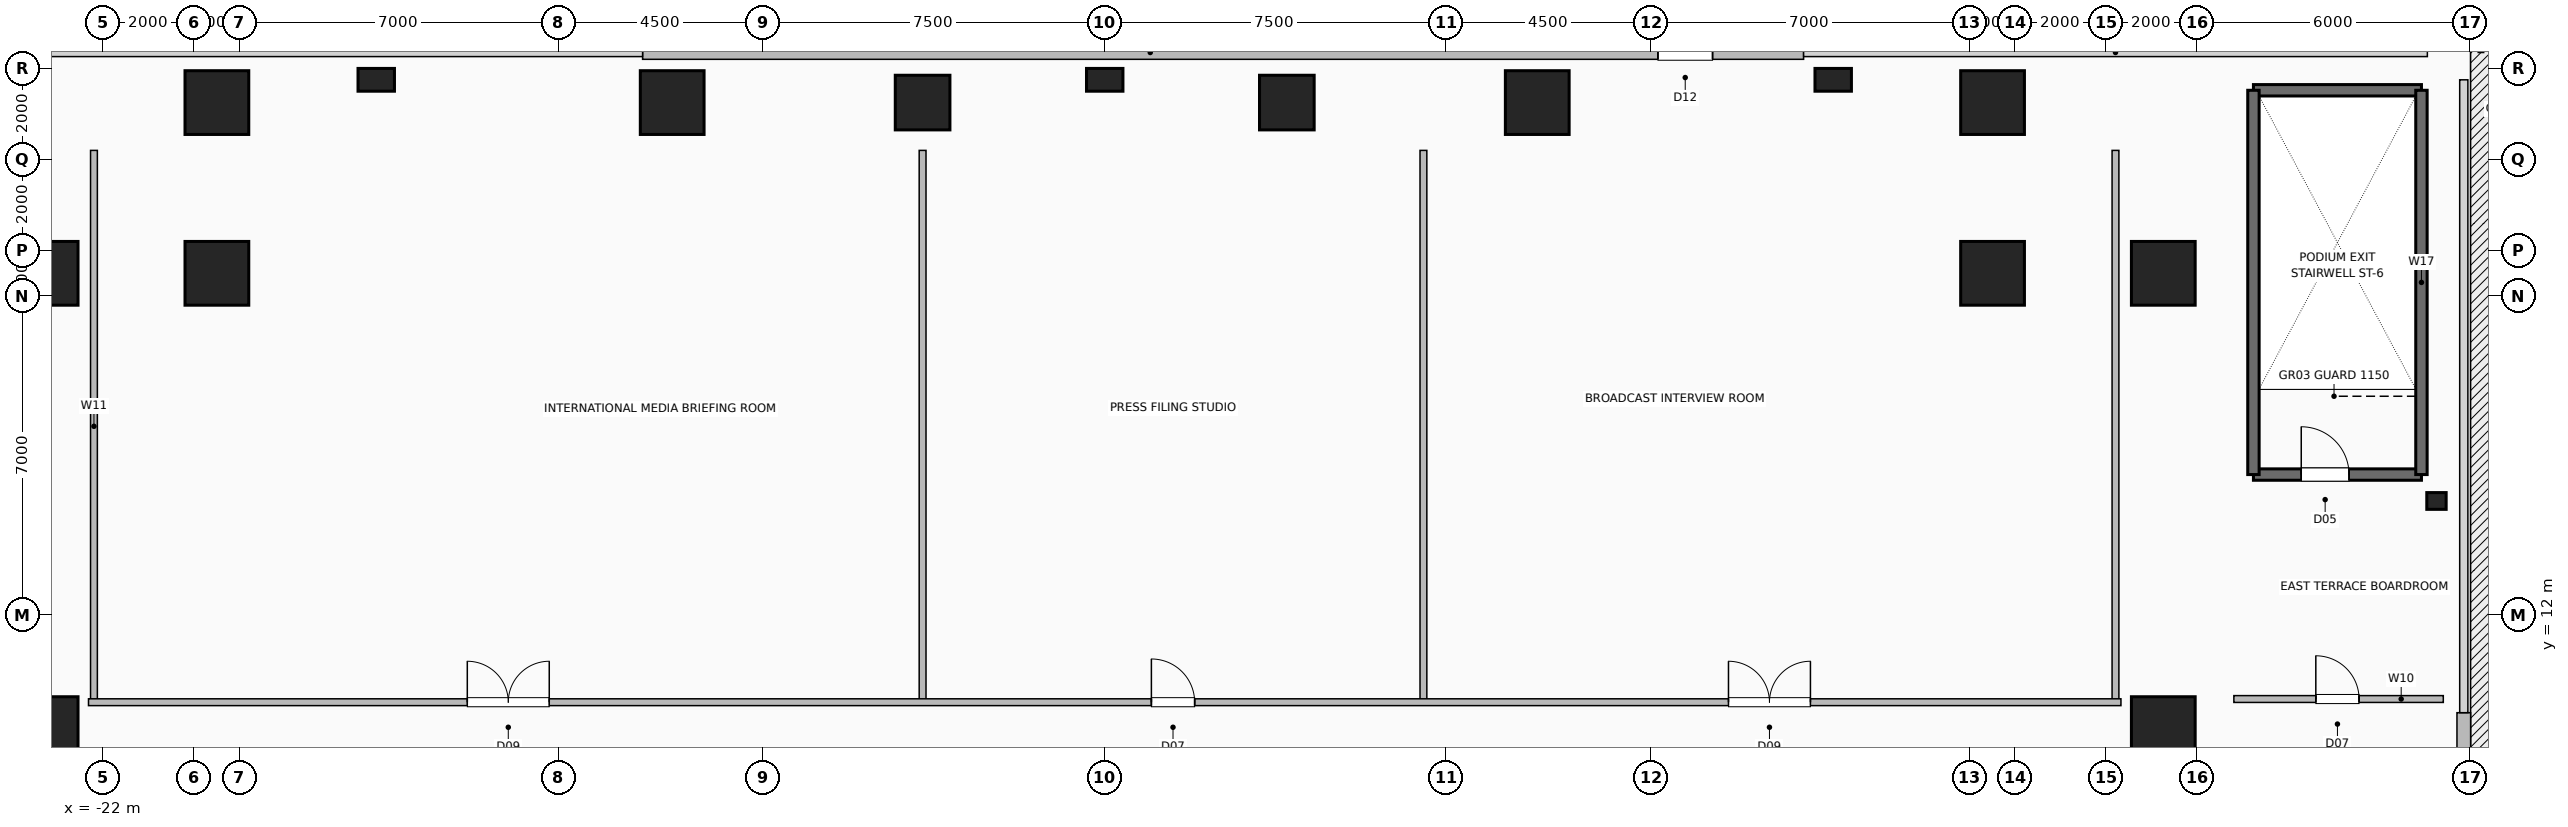
"""IFC4 building model, lengths in metres.
Left out: names, types, materials, properties, quantities, classifications, styles, units other than length and angle.
Written with IfcOpenShell. Run it as: python <this file> out.ifc"""

import sys

from ifc_helpers import new_model, si_unit, direction, frame, frame_2d, origin, origin_2d, place, context, subcontext, project, spatial, rectangle, hollow_rectangle, i_section, extrude, element, fill, save


model = new_model("IFC4")
c1 = context("Model", 3, precision=1e-05, world=origin(), true_north=direction((0.0, 1.0)))
c2 = subcontext(c1, "Body", "Model", "MODEL_VIEW")
j1 = project(units=[si_unit("LENGTHUNIT", "METRE"), si_unit("PLANEANGLEUNIT", "RADIAN")], contexts=[c1])
p1 = place(None, origin())
s1 = spatial("IfcSite", under=j1, at=p1, CompositionType="ELEMENT")
p2 = place(p1, origin())
s2 = spatial("IfcBuilding", under=s1, at=p2, CompositionType="ELEMENT")
p3 = place(p2, frame((0.0, 0.0, 21.6)))
s3 = spatial("IfcBuildingStorey", under=s2, at=p3, CompositionType="ELEMENT", Elevation=21.6)
p4 = place(p3, frame((-19.5, 23.25, 0.0), z_axis=(0.0, 0.0, 1.0), x_axis=(1.0, 0.0, 0.0)))
e1 = element("IfcColumn", 1, at=p4, inside=s3, PredefinedType="COLUMN", context=c2, shape_type="SweptSolid", body=[
    extrude(hollow_rectangle(XDim=1.4, YDim=1.4, WallThickness=0.06, at=origin_2d()), origin(), (0.0, 0.0, 1.0), 5.4),
])
for number, where, z_axis, x_axis in (
    (2, (-9.5, 23.25, 0.0), (0.0, 0.0, 1.0), (1.0, 0.0, 0.0)),
    (3, (9.5, 23.25, 0.0), (0.0, 0.0, 1.0), (1.0, 0.0, 0.0)),
):
    element("IfcColumn", number, at=place(p3, frame(where, z_axis=z_axis, x_axis=x_axis)), inside=s3, PredefinedType="COLUMN", context=c2, shape_type="SweptSolid", body=[
        extrude(hollow_rectangle(XDim=1.4, YDim=1.4, WallThickness=0.06, at=origin_2d()), origin(), (0.0, 0.0, 1.0), 5.0),
    ])
p5 = place(p3, frame((19.5, 23.25, 0.0), z_axis=(0.0, 0.0, 1.0), x_axis=(1.0, 0.0, 0.0)))
e4 = element("IfcColumn", 4, at=p5, inside=s3, PredefinedType="COLUMN", context=c2, shape_type="SweptSolid", body=[
    extrude(hollow_rectangle(XDim=1.4, YDim=1.4, WallThickness=0.06, at=origin_2d()), origin(), (0.0, 0.0, 1.0), 5.4),
])
p6 = place(p3, frame((-23.25, 9.5, 0.0), z_axis=(0.0, 0.0, 1.0), x_axis=(1.0, 0.0, 0.0)))
e5 = element("IfcColumn", 5, at=p6, inside=s3, PredefinedType="COLUMN", context=c2, shape_type="SweptSolid", body=[
    extrude(hollow_rectangle(XDim=1.4, YDim=1.4, WallThickness=0.06, at=origin_2d()), origin(), (0.0, 0.0, 1.0), 5.0),
])
p7 = place(p3, frame((-23.25, 19.5, 0.0), z_axis=(0.0, 0.0, 1.0), x_axis=(1.0, 0.0, 0.0)))
e6 = element("IfcColumn", 6, at=p7, inside=s3, PredefinedType="COLUMN", context=c2, shape_type="SweptSolid", body=[
    extrude(hollow_rectangle(XDim=1.4, YDim=1.4, WallThickness=0.06, at=origin_2d()), origin(), (0.0, 0.0, 1.0), 5.4),
])
p8 = place(p3, frame((23.25, 9.5, 0.0), z_axis=(0.0, 0.0, 1.0), x_axis=(1.0, 0.0, 0.0)))
e7 = element("IfcColumn", 7, at=p8, inside=s3, PredefinedType="COLUMN", context=c2, shape_type="SweptSolid", body=[
    extrude(hollow_rectangle(XDim=1.4, YDim=1.4, WallThickness=0.06, at=origin_2d()), origin(), (0.0, 0.0, 1.0), 5.0),
])
for number, where, z_axis, x_axis in (
    (8, (23.25, 19.5, 0.0), (0.0, 0.0, 1.0), (1.0, 0.0, 0.0)),
    (9, (19.5, 19.5, 0.0), (0.0, 0.0, 1.0), (1.0, 0.0, 0.0)),
    (10, (-19.5, 19.5, 0.0), (0.0, 0.0, 1.0), (1.0, 0.0, 0.0)),
):
    element("IfcColumn", number, at=place(p3, frame(where, z_axis=z_axis, x_axis=x_axis)), inside=s3, PredefinedType="COLUMN", context=c2, shape_type="SweptSolid", body=[
        extrude(hollow_rectangle(XDim=1.4, YDim=1.4, WallThickness=0.06, at=origin_2d()), origin(), (0.0, 0.0, 1.0), 5.4),
    ])
for number, where, z_axis, x_axis in (
    (11, (-4.0, 23.25, -0.4), (0.0, 0.0, 1.0), (1.0, 0.0, 0.0)),
    (12, (4.0, 23.25, -0.4), (0.0, 0.0, 1.0), (1.0, 0.0, 0.0)),
):
    element("IfcColumn", number, at=place(p3, frame(where, z_axis=z_axis, x_axis=x_axis)), inside=s3, PredefinedType="COLUMN", context=c2, shape_type="SweptSolid", body=[
        extrude(hollow_rectangle(XDim=1.2, YDim=1.2, WallThickness=0.055, at=origin_2d()), origin(), (0.0, 0.0, 1.0), 5.8),
    ])
p9 = place(p3, frame((29.25, 14.5, 0.0), z_axis=(0.0, 0.0, 1.0), x_axis=(1.0, 0.0, 0.0)))
e13 = element("IfcColumn", 13, at=p9, inside=s3, PredefinedType="COLUMN", context=c2, shape_type="SweptSolid", body=[
    extrude(i_section(OverallWidth=0.368, OverallDepth=0.425, WebThickness=0.03, FlangeThickness=0.048, FilletRadius=0.02, at=origin_2d()), origin(), (0.0, 0.0, 1.0), 5.0),
])
for number, where, z_axis, x_axis in (
    (14, (-16.0, 23.75, 0.0), (0.0, 0.0, 1.0), (1.0, 0.0, 0.0)),
    (15, (0.0, 23.75, 0.0), (0.0, 0.0, 1.0), (1.0, 0.0, 0.0)),
    (16, (16.0, 23.75, 0.0), (0.0, 0.0, 1.0), (1.0, 0.0, 0.0)),
):
    element("IfcColumn", number, at=place(p3, frame(where, z_axis=z_axis, x_axis=x_axis)), inside=s3, PredefinedType="PILASTER", context=c2, shape_type="SweptSolid", body=[
        extrude(rectangle(XDim=0.5, YDim=0.8, at=origin_2d()), origin(), (0.0, 0.0, 1.0), 5.0),
    ])
p10 = place(p3, frame((29.85, -23.75, 0.0), z_axis=(0.0, 0.0, 1.0), x_axis=(0.0, 1.0, 0.0)))
e17 = element("IfcWall", 17, at=p10, inside=s3, PredefinedType="SOLIDWALL", context=c2, shape_type="SweptSolid", body=[
    extrude(rectangle(XDim=33.6, YDim=0.3, at=frame_2d((16.8, 0.0))), origin(), (0.0, 0.0, 1.0), 5.0),
])
p11 = place(p10, frame((30.4, 0.0, 0.0)))
e18 = element("IfcOpeningElement", 18, at=p11, cuts=e17, PredefinedType="OPENING", context=c2, shape_type="SweptSolid", body=[
    extrude(rectangle(XDim=1.2, YDim=2.25, at=frame_2d((0.6, 1.125))), frame((0.0, 0.16, 0.0), z_axis=(0.0, -1.0, 0.0), x_axis=(1.0, 0.0, 0.0)), (0.0, 0.0, 1.0), 0.32),
])
p12 = place(p3, frame((-10.15, 24.35, 0.0), z_axis=(0.0, 0.0, 1.0), x_axis=(1.0, 0.0, 0.0)))
e19 = element("IfcWall", 19, at=p12, inside=s3, PredefinedType="SOLIDWALL", context=c2, shape_type="SweptSolid", body=[
    extrude(rectangle(XDim=25.5, YDim=0.3, at=frame_2d((12.75, 0.0))), origin(), (0.0, 0.0, 1.0), 5.0),
])
p13 = place(p12, frame((22.3, 0.0, 0.0)))
e20 = element("IfcOpeningElement", 20, at=p13, cuts=e19, PredefinedType="OPENING", context=c2, shape_type="SweptSolid", body=[
    extrude(rectangle(XDim=1.2, YDim=2.25, at=frame_2d((0.6, 1.125))), frame((0.0, 0.16, 0.0), z_axis=(0.0, -1.0, 0.0), x_axis=(1.0, 0.0, 0.0)), (0.0, 0.0, 1.0), 0.32),
])
p14 = place(p3, frame((25.23, 15.08, 0.0), z_axis=(0.0, 0.0, 1.0), x_axis=(1.0, 0.0, 0.0)))
e21 = element("IfcWall", 21, at=p14, inside=s3, PredefinedType="SHEAR", context=c2, shape_type="SweptSolid", body=[
    extrude(rectangle(XDim=3.69, YDim=0.25, at=frame_2d((1.845, 0.0))), origin(), (0.0, 0.0, 1.0), 5.0),
])
p15 = place(p14, frame((1.05, 0.0, 0.0)))
e22 = element("IfcOpeningElement", 22, at=p15, cuts=e21, PredefinedType="OPENING", context=c2, shape_type="SweptSolid", body=[
    extrude(rectangle(XDim=1.05, YDim=2.08, at=frame_2d((0.525, 1.04))), frame((0.0, 0.135, 0.0), z_axis=(0.0, -1.0, 0.0), x_axis=(1.0, 0.0, 0.0)), (0.0, 0.0, 1.0), 0.27),
])
p16 = place(p3, frame((25.23, 23.52, 0.0), z_axis=(0.0, 0.0, 1.0), x_axis=(1.0, 0.0, 0.0)))
e23 = element("IfcWall", 23, at=p16, inside=s3, PredefinedType="SHEAR", context=c2, shape_type="SweptSolid", body=[
    extrude(rectangle(XDim=3.69, YDim=0.25, at=frame_2d((1.845, 0.0))), origin(), (0.0, 0.0, 1.0), 5.0),
])
for number, where, z_axis, x_axis in (
    (24, (25.23, 15.08, 0.0), (0.0, 0.0, 1.0), (0.0, 1.0, 0.0)),
    (25, (28.92, 15.08, 0.0), (0.0, 0.0, 1.0), (0.0, 1.0, 0.0)),
):
    element("IfcWall", number, at=place(p3, frame(where, z_axis=z_axis, x_axis=x_axis)), inside=s3, PredefinedType="SHEAR", context=c2, shape_type="SweptSolid", body=[
        extrude(rectangle(XDim=8.44, YDim=0.25, at=frame_2d((4.22, 0.0))), origin(), (0.0, 0.0, 1.0), 5.0),
    ])
p17 = place(p3, frame((-22.2, 10.08, 0.0), z_axis=(0.0, 0.0, 1.0), x_axis=(0.0, 1.0, 0.0)))
e26 = element("IfcWall", 26, at=p17, inside=s3, PredefinedType="PARTITIONING", context=c2, shape_type="SweptSolid", body=[
    extrude(rectangle(XDim=12.12, YDim=0.15, at=frame_2d((6.06, 0.0))), origin(), (0.0, 0.0, 1.0), 5.0),
])
p18 = place(p3, frame((-4.0, 10.08, 0.0), z_axis=(0.0, 0.0, 1.0), x_axis=(0.0, 1.0, 0.0)))
e27 = element("IfcWall", 27, at=p18, inside=s3, PredefinedType="PARTITIONING", context=c2, shape_type="SweptSolid", body=[
    extrude(rectangle(XDim=12.12, YDim=0.15, at=frame_2d((6.06, 0.0))), origin(), (0.0, 0.0, 1.0), 3.375),
])
for number, where, z_axis, x_axis in (
    (28, (7.0, 10.08, 0.0), (0.0, 0.0, 1.0), (0.0, 1.0, 0.0)),
    (29, (22.2, 10.08, 0.0), (0.0, 0.0, 1.0), (0.0, 1.0, 0.0)),
):
    element("IfcWall", number, at=place(p3, frame(where, z_axis=z_axis, x_axis=x_axis)), inside=s3, PredefinedType="PARTITIONING", context=c2, shape_type="SweptSolid", body=[
        extrude(rectangle(XDim=12.12, YDim=0.15, at=frame_2d((6.06, 0.0))), origin(), (0.0, 0.0, 1.0), 5.0),
    ])
p19 = place(p3, frame((-22.32, 10.08, 0.0), z_axis=(0.0, 0.0, 1.0), x_axis=(1.0, 0.0, 0.0)))
e30 = element("IfcWall", 30, at=p19, inside=s3, PredefinedType="PARTITIONING", context=c2, shape_type="SweptSolid", body=[
    extrude(rectangle(XDim=44.64, YDim=0.15, at=frame_2d((22.32, 0.0))), origin(), (0.0, 0.0, 1.0), 5.0),
])
p20 = place(p19, frame((8.32, 0.0, 0.0)))
e31 = element("IfcOpeningElement", 31, at=p20, cuts=e30, PredefinedType="OPENING", context=c2, shape_type="SweptSolid", body=[
    extrude(rectangle(XDim=1.8, YDim=2.08, at=frame_2d((0.9, 1.04))), frame((0.0, 0.085, 0.0), z_axis=(0.0, -1.0, 0.0), x_axis=(1.0, 0.0, 0.0)), (0.0, 0.0, 1.0), 0.17),
])
p21 = place(p19, frame((23.345, 0.0, 0.0)))
e32 = element("IfcOpeningElement", 32, at=p21, cuts=e30, PredefinedType="OPENING", context=c2, shape_type="SweptSolid", body=[
    extrude(rectangle(XDim=0.95, YDim=2.06, at=frame_2d((0.475, 1.03))), frame((0.0, 0.085, 0.0), z_axis=(0.0, -1.0, 0.0), x_axis=(1.0, 0.0, 0.0)), (0.0, 0.0, 1.0), 0.17),
])
p22 = place(p19, frame((36.02, 0.0, 0.0)))
e33 = element("IfcOpeningElement", 33, at=p22, cuts=e30, PredefinedType="OPENING", context=c2, shape_type="SweptSolid", body=[
    extrude(rectangle(XDim=1.8, YDim=2.08, at=frame_2d((0.9, 1.04))), frame((0.0, 0.085, 0.0), z_axis=(0.0, -1.0, 0.0), x_axis=(1.0, 0.0, 0.0)), (0.0, 0.0, 1.0), 0.17),
])
p23 = place(p3, frame((24.8, 10.15, 0.0), z_axis=(0.0, 0.0, 1.0), x_axis=(1.0, 0.0, 0.0)))
e34 = element("IfcWall", 34, at=p23, inside=s3, PredefinedType="PARTITIONING", context=c2, shape_type="SweptSolid", body=[
    extrude(rectangle(XDim=4.6, YDim=0.15, at=frame_2d((2.3, 0.0))), origin(), (0.0, 0.0, 1.0), 5.0),
])
p24 = place(p23, frame((1.8, 0.0, 0.0)))
e35 = element("IfcOpeningElement", 35, at=p24, cuts=e34, PredefinedType="OPENING", context=c2, shape_type="SweptSolid", body=[
    extrude(rectangle(XDim=0.95, YDim=2.06, at=frame_2d((0.475, 1.03))), frame((0.0, 0.085, 0.0), z_axis=(0.0, -1.0, 0.0), x_axis=(1.0, 0.0, 0.0)), (0.0, 0.0, 1.0), 0.17),
])
p25 = place(p13, origin())
e36 = element("IfcDoor", 36, at=p25, inside=s3, OperationType="SINGLE_SWING_LEFT", PredefinedType="DOOR", context=c2, shape_type="SweptSolid", body=[
    extrude(rectangle(XDim=1.2, YDim=2.25, at=frame_2d((0.6, 1.125))), frame((0.0, 0.025, 0.0), z_axis=(0.0, -1.0, 0.0), x_axis=(1.0, 0.0, 0.0)), (0.0, 0.0, 1.0), 0.05),
])
fill(e20, e36)
p26 = place(p15, origin())
e37 = element("IfcDoor", 37, at=p26, inside=s3, OperationType="SINGLE_SWING_LEFT", PredefinedType="DOOR", context=c2, shape_type="SweptSolid", body=[
    extrude(rectangle(XDim=1.05, YDim=2.08, at=frame_2d((0.525, 1.04))), frame((0.0, 0.025, 0.0), z_axis=(0.0, -1.0, 0.0), x_axis=(1.0, 0.0, 0.0)), (0.0, 0.0, 1.0), 0.05),
])
fill(e22, e37)
p27 = place(p20, origin())
e38 = element("IfcDoor", 38, at=p27, inside=s3, OperationType="DOUBLE_DOOR_SINGLE_SWING", PredefinedType="DOOR", context=c2, shape_type="SweptSolid", body=[
    extrude(rectangle(XDim=1.8, YDim=2.08, at=frame_2d((0.9, 1.04))), frame((0.0, 0.025, 0.0), z_axis=(0.0, -1.0, 0.0), x_axis=(1.0, 0.0, 0.0)), (0.0, 0.0, 1.0), 0.05),
])
fill(e31, e38)
p28 = place(p21, origin())
e39 = element("IfcDoor", 39, at=p28, inside=s3, OperationType="SINGLE_SWING_LEFT", PredefinedType="DOOR", context=c2, shape_type="SweptSolid", body=[
    extrude(rectangle(XDim=0.95, YDim=2.06, at=frame_2d((0.475, 1.03))), frame((0.0, 0.025, 0.0), z_axis=(0.0, -1.0, 0.0), x_axis=(1.0, 0.0, 0.0)), (0.0, 0.0, 1.0), 0.05),
])
fill(e32, e39)
p29 = place(p22, origin())
e40 = element("IfcDoor", 40, at=p29, inside=s3, OperationType="DOUBLE_DOOR_SINGLE_SWING", PredefinedType="DOOR", context=c2, shape_type="SweptSolid", body=[
    extrude(rectangle(XDim=1.8, YDim=2.08, at=frame_2d((0.9, 1.04))), frame((0.0, 0.025, 0.0), z_axis=(0.0, -1.0, 0.0), x_axis=(1.0, 0.0, 0.0)), (0.0, 0.0, 1.0), 0.05),
])
fill(e33, e40)
p30 = place(p24, origin())
e41 = element("IfcDoor", 41, at=p30, inside=s3, OperationType="SINGLE_SWING_LEFT", PredefinedType="DOOR", context=c2, shape_type="SweptSolid", body=[
    extrude(rectangle(XDim=0.95, YDim=2.06, at=frame_2d((0.475, 1.03))), frame((0.0, 0.025, 0.0), z_axis=(0.0, -1.0, 0.0), x_axis=(1.0, 0.0, 0.0)), (0.0, 0.0, 1.0), 0.05),
])
fill(e35, e41)
save(model, sys.argv[1])
